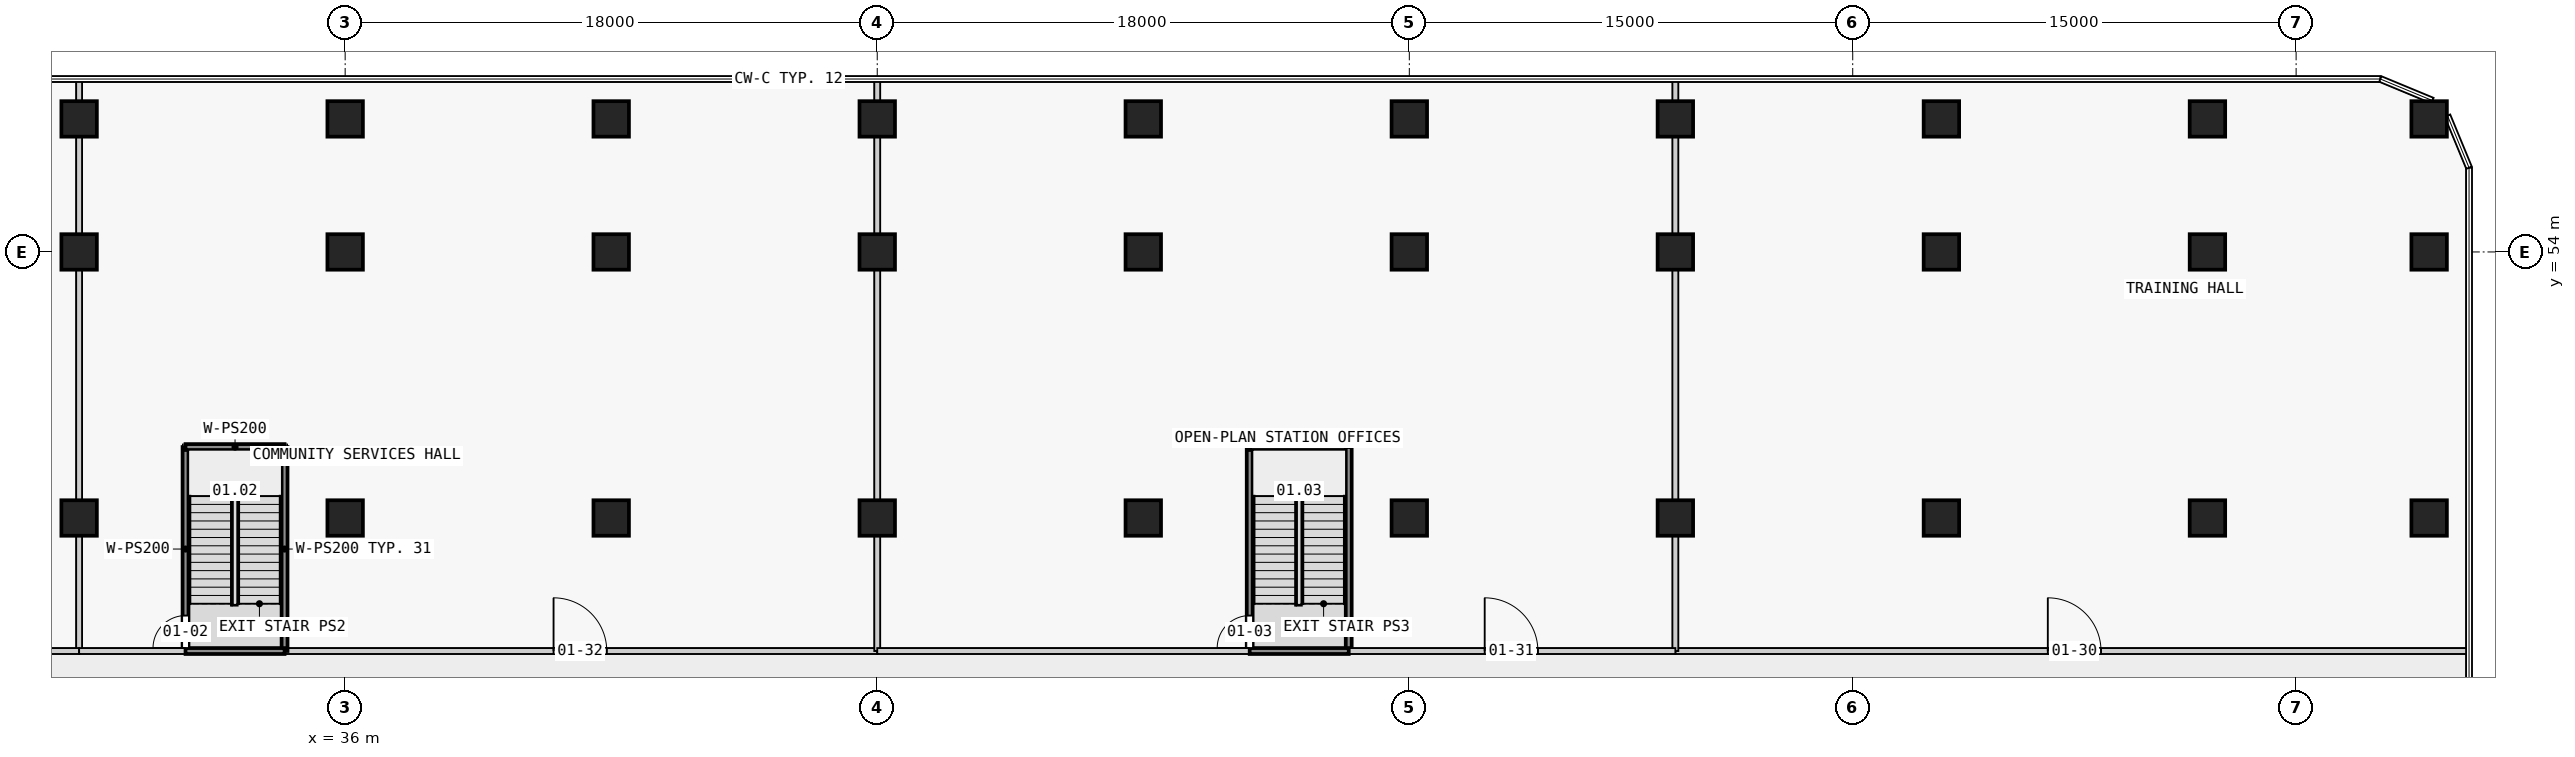
"""IFC4 building model, lengths in metres.
Left out: names, types, materials, properties, quantities, classifications, styles, units other than length and angle.
Written with IfcOpenShell. Run it as: python <this file> out.ifc"""

import sys

from ifc_helpers import new_model, si_unit, direction, frame, frame_2d, origin, origin_2d, place, context, subcontext, project, spatial, rectangle, extrude, element, fill, save


model = new_model("IFC4")
c1 = context("Model", 3, precision=1e-05, world=origin(), true_north=direction((0.0, 1.0)))
c2 = subcontext(c1, "Body", "Model", "MODEL_VIEW")
j1 = project(units=[si_unit("LENGTHUNIT", "METRE"), si_unit("PLANEANGLEUNIT", "RADIAN")], contexts=[c1])
p1 = place(None, origin())
s1 = spatial("IfcSite", under=j1, at=p1, CompositionType="ELEMENT")
p2 = place(p1, origin())
s2 = spatial("IfcBuilding", under=s1, at=p2, CompositionType="ELEMENT")
p3 = place(p2, frame((0.0, 0.0, 8.0)))
s3 = spatial("IfcBuildingStorey", under=s2, at=p3, CompositionType="ELEMENT", Elevation=8.0)
for number, where, z_axis, x_axis in (
    (1, (27.0, 45.0, 0.0), (0.0, 0.0, 1.0), (1.0, 0.0, 0.0)),
    (2, (27.0, 54.0, 0.0), (0.0, 0.0, 1.0), (1.0, 0.0, 0.0)),
    (3, (27.0, 58.5, 0.0), (0.0, 0.0, 1.0), (1.0, 0.0, 0.0)),
    (4, (36.0, 45.0, 0.0), (0.0, 0.0, 1.0), (1.0, 0.0, 0.0)),
    (5, (36.0, 54.0, 0.0), (0.0, 0.0, 1.0), (1.0, 0.0, 0.0)),
    (6, (36.0, 58.5, 0.0), (0.0, 0.0, 1.0), (1.0, 0.0, 0.0)),
    (7, (45.0, 45.0, 0.0), (0.0, 0.0, 1.0), (1.0, 0.0, 0.0)),
    (8, (45.0, 54.0, 0.0), (0.0, 0.0, 1.0), (1.0, 0.0, 0.0)),
    (9, (45.0, 58.5, 0.0), (0.0, 0.0, 1.0), (1.0, 0.0, 0.0)),
    (10, (54.0, 45.0, 0.0), (0.0, 0.0, 1.0), (1.0, 0.0, 0.0)),
    (11, (54.0, 54.0, 0.0), (0.0, 0.0, 1.0), (1.0, 0.0, 0.0)),
    (12, (54.0, 58.5, 0.0), (0.0, 0.0, 1.0), (1.0, 0.0, 0.0)),
    (13, (63.0, 45.0, 0.0), (0.0, 0.0, 1.0), (1.0, 0.0, 0.0)),
    (14, (63.0, 54.0, 0.0), (0.0, 0.0, 1.0), (1.0, 0.0, 0.0)),
    (15, (63.0, 58.5, 0.0), (0.0, 0.0, 1.0), (1.0, 0.0, 0.0)),
    (16, (72.0, 45.0, 0.0), (0.0, 0.0, 1.0), (1.0, 0.0, 0.0)),
    (17, (72.0, 54.0, 0.0), (0.0, 0.0, 1.0), (1.0, 0.0, 0.0)),
    (18, (72.0, 58.5, 0.0), (0.0, 0.0, 1.0), (1.0, 0.0, 0.0)),
    (19, (81.0, 45.0, 0.0), (0.0, 0.0, 1.0), (1.0, 0.0, 0.0)),
    (20, (81.0, 54.0, 0.0), (0.0, 0.0, 1.0), (1.0, 0.0, 0.0)),
    (21, (81.0, 58.5, 0.0), (0.0, 0.0, 1.0), (1.0, 0.0, 0.0)),
    (22, (90.0, 45.0, 0.0), (0.0, 0.0, 1.0), (1.0, 0.0, 0.0)),
    (23, (90.0, 54.0, 0.0), (0.0, 0.0, 1.0), (1.0, 0.0, 0.0)),
    (24, (90.0, 58.5, 0.0), (0.0, 0.0, 1.0), (1.0, 0.0, 0.0)),
    (25, (99.0, 45.0, 0.0), (0.0, 0.0, 1.0), (1.0, 0.0, 0.0)),
    (26, (99.0, 54.0, 0.0), (0.0, 0.0, 1.0), (1.0, 0.0, 0.0)),
    (27, (99.0, 58.5, 0.0), (0.0, 0.0, 1.0), (1.0, 0.0, 0.0)),
    (28, (106.5, 45.0, 0.0), (0.0, 0.0, 1.0), (1.0, 0.0, 0.0)),
    (29, (106.5, 54.0, 0.0), (0.0, 0.0, 1.0), (1.0, 0.0, 0.0)),
    (30, (106.5, 58.5, 0.0), (0.0, 0.0, 1.0), (1.0, 0.0, 0.0)),
):
    element("IfcColumn", number, at=place(p3, frame(where, z_axis=z_axis, x_axis=x_axis)), inside=s3, PredefinedType="COLUMN", context=c2, shape_type="SweptSolid", body=[
        extrude(rectangle(XDim=1.2, YDim=1.2, at=origin_2d()), origin(), (0.0, 0.0, 1.0), 4.8),
    ])
p4 = place(p3, frame((81.0, 40.5, 0.0), z_axis=(0.0, 0.0, 1.0), x_axis=(1.0, 0.0, 0.0)))
e31 = element("IfcWall", 31, at=p4, inside=s3, PredefinedType="PARTITIONING", context=c2, shape_type="SweptSolid", body=[
    extrude(rectangle(XDim=26.85, YDim=0.2, at=frame_2d((13.425, 0.0))), origin(), (0.0, 0.0, 1.0), 3.75),
])
p5 = place(p4, frame((12.6, 0.0, 0.0)))
e32 = element("IfcOpeningElement", 32, at=p5, cuts=e31, PredefinedType="OPENING", context=c2, shape_type="SweptSolid", body=[
    extrude(rectangle(XDim=1.8, YDim=2.1, at=frame_2d((0.9, 1.05))), frame((0.0, 0.11, 0.0), z_axis=(0.0, -1.0, 0.0), x_axis=(1.0, 0.0, 0.0)), (0.0, 0.0, 1.0), 0.22),
])
p6 = place(p3, frame((33.95, 40.5, 0.0), z_axis=(0.0, 0.0, 1.0), x_axis=(1.0, 0.0, 0.0)))
e33 = element("IfcWall", 33, at=p6, inside=s3, PredefinedType="PARTITIONING", context=c2, shape_type="SweptSolid", body=[
    extrude(rectangle(XDim=20.05, YDim=0.2, at=frame_2d((10.025, 0.0))), origin(), (0.0, 0.0, 1.0), 3.75),
])
p7 = place(p6, frame((9.1, 0.0, 0.0)))
e34 = element("IfcOpeningElement", 34, at=p7, cuts=e33, PredefinedType="OPENING", context=c2, shape_type="SweptSolid", body=[
    extrude(rectangle(XDim=1.8, YDim=2.1, at=frame_2d((0.9, 1.05))), frame((0.0, 0.11, 0.0), z_axis=(0.0, -1.0, 0.0), x_axis=(1.0, 0.0, 0.0)), (0.0, 0.0, 1.0), 0.22),
])
p8 = place(p3, frame((54.0, 59.85, 0.0), z_axis=(0.0, 0.0, 1.0), x_axis=(0.0, -1.0, 0.0)))
e35 = element("IfcWall", 35, at=p8, inside=s3, PredefinedType="PARTITIONING", context=c2, shape_type="SweptSolid", body=[
    extrude(rectangle(XDim=0.75, YDim=0.2, at=frame_2d((0.375, 0.0))), origin(), (0.0, 0.0, 1.0), 4.45),
])
p9 = place(p3, frame((54.0, 57.9, 0.0), z_axis=(0.0, 0.0, 1.0), x_axis=(0.0, -1.0, 0.0)))
e36 = element("IfcWall", 36, at=p9, inside=s3, PredefinedType="PARTITIONING", context=c2, shape_type="SweptSolid", body=[
    extrude(rectangle(XDim=3.3, YDim=0.2, at=frame_2d((1.65, 0.0))), origin(), (0.0, 0.0, 1.0), 3.75),
])
p10 = place(p3, frame((54.0, 53.4, 0.0), z_axis=(0.0, 0.0, 1.0), x_axis=(0.0, -1.0, 0.0)))
e37 = element("IfcWall", 37, at=p10, inside=s3, PredefinedType="PARTITIONING", context=c2, shape_type="SweptSolid", body=[
    extrude(rectangle(XDim=7.8, YDim=0.2, at=frame_2d((3.9, 0.0))), origin(), (0.0, 0.0, 1.0), 3.75),
])
p11 = place(p3, frame((54.0, 44.4, 0.0), z_axis=(0.0, 0.0, 1.0), x_axis=(0.0, -1.0, 0.0)))
e38 = element("IfcWall", 38, at=p11, inside=s3, PredefinedType="PARTITIONING", context=c2, shape_type="SweptSolid", body=[
    extrude(rectangle(XDim=3.9, YDim=0.2, at=frame_2d((1.95, 0.0))), origin(), (0.0, 0.0, 1.0), 3.75),
])
p12 = place(p3, frame((81.0, 59.85, 0.0), z_axis=(0.0, 0.0, 1.0), x_axis=(0.0, -1.0, 0.0)))
e39 = element("IfcWall", 39, at=p12, inside=s3, PredefinedType="PARTITIONING", context=c2, shape_type="SweptSolid", body=[
    extrude(rectangle(XDim=0.75, YDim=0.2, at=frame_2d((0.375, 0.0))), origin(), (0.0, 0.0, 1.0), 4.45),
])
p13 = place(p3, frame((81.0, 57.9, 0.0), z_axis=(0.0, 0.0, 1.0), x_axis=(0.0, -1.0, 0.0)))
e40 = element("IfcWall", 40, at=p13, inside=s3, PredefinedType="PARTITIONING", context=c2, shape_type="SweptSolid", body=[
    extrude(rectangle(XDim=3.3, YDim=0.2, at=frame_2d((1.65, 0.0))), origin(), (0.0, 0.0, 1.0), 3.75),
])
p14 = place(p3, frame((81.0, 53.4, 0.0), z_axis=(0.0, 0.0, 1.0), x_axis=(0.0, -1.0, 0.0)))
e41 = element("IfcWall", 41, at=p14, inside=s3, PredefinedType="PARTITIONING", context=c2, shape_type="SweptSolid", body=[
    extrude(rectangle(XDim=7.8, YDim=0.2, at=frame_2d((3.9, 0.0))), origin(), (0.0, 0.0, 1.0), 3.75),
])
p15 = place(p3, frame((81.0, 44.4, 0.0), z_axis=(0.0, 0.0, 1.0), x_axis=(0.0, -1.0, 0.0)))
e42 = element("IfcWall", 42, at=p15, inside=s3, PredefinedType="PARTITIONING", context=c2, shape_type="SweptSolid", body=[
    extrude(rectangle(XDim=3.9, YDim=0.2, at=frame_2d((1.95, 0.0))), origin(), (0.0, 0.0, 1.0), 3.75),
])
p16 = place(p3, frame((27.0, 59.85, 0.0), z_axis=(0.0, 0.0, 1.0), x_axis=(0.0, -1.0, 0.0)))
e43 = element("IfcWall", 43, at=p16, inside=s3, PredefinedType="PARTITIONING", context=c2, shape_type="SweptSolid", body=[
    extrude(rectangle(XDim=0.75, YDim=0.2, at=frame_2d((0.375, 0.0))), origin(), (0.0, 0.0, 1.0), 4.45),
])
p17 = place(p3, frame((27.0, 57.9, 0.0), z_axis=(0.0, 0.0, 1.0), x_axis=(0.0, -1.0, 0.0)))
e44 = element("IfcWall", 44, at=p17, inside=s3, PredefinedType="PARTITIONING", context=c2, shape_type="SweptSolid", body=[
    extrude(rectangle(XDim=3.3, YDim=0.2, at=frame_2d((1.65, 0.0))), origin(), (0.0, 0.0, 1.0), 3.75),
])
p18 = place(p3, frame((27.0, 53.4, 0.0), z_axis=(0.0, 0.0, 1.0), x_axis=(0.0, -1.0, 0.0)))
e45 = element("IfcWall", 45, at=p18, inside=s3, PredefinedType="PARTITIONING", context=c2, shape_type="SweptSolid", body=[
    extrude(rectangle(XDim=7.8, YDim=0.2, at=frame_2d((3.9, 0.0))), origin(), (0.0, 0.0, 1.0), 3.75),
])
p19 = place(p3, frame((27.0, 44.4, 0.0), z_axis=(0.0, 0.0, 1.0), x_axis=(0.0, -1.0, 0.0)))
e46 = element("IfcWall", 46, at=p19, inside=s3, PredefinedType="PARTITIONING", context=c2, shape_type="SweptSolid", body=[
    extrude(rectangle(XDim=3.9, YDim=0.2, at=frame_2d((1.95, 0.0))), origin(), (0.0, 0.0, 1.0), 3.75),
])
p20 = place(p3, frame((30.6, 40.5, 0.0), z_axis=(0.0, 0.0, 1.0), x_axis=(0.0, 1.0, 0.0)))
e47 = element("IfcWall", 47, at=p20, inside=s3, PredefinedType="PARTITIONING", context=c2, shape_type="SweptSolid", body=[
    extrude(rectangle(XDim=6.9, YDim=0.2, at=frame_2d((3.45, 0.0))), origin(), (0.0, 0.0, 1.0), 4.45),
])
p21 = place(p20, frame((0.1, 0.0, 0.0)))
e48 = element("IfcOpeningElement", 48, at=p21, cuts=e47, PredefinedType="OPENING", context=c2, shape_type="SweptSolid", body=[
    extrude(rectangle(XDim=1.1, YDim=2.1, at=frame_2d((0.55, 1.05))), frame((0.0, 0.11, 0.0), z_axis=(0.0, -1.0, 0.0), x_axis=(1.0, 0.0, 0.0)), (0.0, 0.0, 1.0), 0.22),
])
p22 = place(p3, frame((30.6, 47.4, 0.0), z_axis=(0.0, 0.0, 1.0), x_axis=(1.0, 0.0, 0.0)))
e49 = element("IfcWall", 49, at=p22, inside=s3, PredefinedType="PARTITIONING", context=c2, shape_type="SweptSolid", body=[
    extrude(rectangle(XDim=3.35, YDim=0.2, at=frame_2d((1.675, 0.0))), origin(), (0.0, 0.0, 1.0), 4.45),
])
p23 = place(p3, frame((33.95, 47.4, 0.0), z_axis=(0.0, 0.0, 1.0), x_axis=(0.0, -1.0, 0.0)))
e50 = element("IfcWall", 50, at=p23, inside=s3, PredefinedType="PARTITIONING", context=c2, shape_type="SweptSolid", body=[
    extrude(rectangle(XDim=6.9, YDim=0.2, at=frame_2d((3.45, 0.0))), origin(), (0.0, 0.0, 1.0), 4.45),
])
p24 = place(p3, frame((66.6, 40.5, 0.0), z_axis=(0.0, 0.0, 1.0), x_axis=(0.0, 1.0, 0.0)))
e51 = element("IfcWall", 51, at=p24, inside=s3, PredefinedType="PARTITIONING", context=c2, shape_type="SweptSolid", body=[
    extrude(rectangle(XDim=6.9, YDim=0.2, at=frame_2d((3.45, 0.0))), origin(), (0.0, 0.0, 1.0), 4.45),
])
p25 = place(p24, frame((0.1, 0.0, 0.0)))
e52 = element("IfcOpeningElement", 52, at=p25, cuts=e51, PredefinedType="OPENING", context=c2, shape_type="SweptSolid", body=[
    extrude(rectangle(XDim=1.1, YDim=2.1, at=frame_2d((0.55, 1.05))), frame((0.0, 0.11, 0.0), z_axis=(0.0, -1.0, 0.0), x_axis=(1.0, 0.0, 0.0)), (0.0, 0.0, 1.0), 0.22),
])
p26 = place(p3, frame((66.6, 47.4, 0.0), z_axis=(0.0, 0.0, 1.0), x_axis=(1.0, 0.0, 0.0)))
e53 = element("IfcWall", 53, at=p26, inside=s3, PredefinedType="PARTITIONING", context=c2, shape_type="SweptSolid", body=[
    extrude(rectangle(XDim=3.35, YDim=0.2, at=frame_2d((1.675, 0.0))), origin(), (0.0, 0.0, 1.0), 4.45),
])
p27 = place(p3, frame((69.95, 47.4, 0.0), z_axis=(0.0, 0.0, 1.0), x_axis=(0.0, -1.0, 0.0)))
e54 = element("IfcWall", 54, at=p27, inside=s3, PredefinedType="PARTITIONING", context=c2, shape_type="SweptSolid", body=[
    extrude(rectangle(XDim=6.9, YDim=0.2, at=frame_2d((3.45, 0.0))), origin(), (0.0, 0.0, 1.0), 4.45),
])
p28 = place(p3, frame((54.0, 40.5, 0.0), z_axis=(0.0, 0.0, 1.0), x_axis=(1.0, 0.0, 0.0)))
e55 = element("IfcWall", 55, at=p28, inside=s3, PredefinedType="PARTITIONING", context=c2, shape_type="SweptSolid", body=[
    extrude(rectangle(XDim=12.6, YDim=0.2, at=frame_2d((6.3, 0.0))), origin(), (0.0, 0.0, 1.0), 3.75),
])
p29 = place(p3, frame((69.95, 40.5, 0.0), z_axis=(0.0, 0.0, 1.0), x_axis=(1.0, 0.0, 0.0)))
e56 = element("IfcWall", 56, at=p29, inside=s3, PredefinedType="PARTITIONING", context=c2, shape_type="SweptSolid", body=[
    extrude(rectangle(XDim=11.05, YDim=0.2, at=frame_2d((5.525, 0.0))), origin(), (0.0, 0.0, 1.0), 3.75),
])
p30 = place(p29, frame((4.6, 0.0, 0.0)))
e57 = element("IfcOpeningElement", 57, at=p30, cuts=e56, PredefinedType="OPENING", context=c2, shape_type="SweptSolid", body=[
    extrude(rectangle(XDim=1.8, YDim=2.1, at=frame_2d((0.9, 1.05))), frame((0.0, 0.11, 0.0), z_axis=(0.0, -1.0, 0.0), x_axis=(1.0, 0.0, 0.0)), (0.0, 0.0, 1.0), 0.22),
])
p31 = place(p3, frame((16.15, 40.5, 0.0), z_axis=(0.0, 0.0, 1.0), x_axis=(1.0, 0.0, 0.0)))
e58 = element("IfcWall", 58, at=p31, inside=s3, PredefinedType="PARTITIONING", context=c2, shape_type="SweptSolid", body=[
    extrude(rectangle(XDim=10.85, YDim=0.2, at=frame_2d((5.425, 0.0))), origin(), (0.0, 0.0, 1.0), 3.75),
])
p32 = place(p3, frame((27.0, 40.5, 0.0), z_axis=(0.0, 0.0, 1.0), x_axis=(1.0, 0.0, 0.0)))
e59 = element("IfcWall", 59, at=p32, inside=s3, PredefinedType="PARTITIONING", context=c2, shape_type="SweptSolid", body=[
    extrude(rectangle(XDim=3.6, YDim=0.2, at=frame_2d((1.8, 0.0))), origin(), (0.0, 0.0, 1.0), 3.75),
])
for number, where, z_axis, x_axis in (
    (60, (33.95, 40.5, 0.0), (0.0, 0.0, 1.0), (-1.0, 0.0, 0.0)),
    (61, (69.95, 40.5, 0.0), (0.0, 0.0, 1.0), (-1.0, 0.0, 0.0)),
):
    element("IfcWall", number, at=place(p3, frame(where, z_axis=z_axis, x_axis=x_axis)), inside=s3, PredefinedType="PARTITIONING", context=c2, shape_type="SweptSolid", body=[
        extrude(rectangle(XDim=3.35, YDim=0.2, at=frame_2d((1.675, 0.0))), origin(), (0.0, 0.0, 1.0), 4.45),
    ])
p33 = place(p21, origin())
e62 = element("IfcDoor", 62, at=p33, inside=s3, OperationType="SINGLE_SWING_LEFT", PredefinedType="DOOR", context=c2, shape_type="SweptSolid", body=[
    extrude(rectangle(XDim=1.1, YDim=2.1, at=frame_2d((0.55, 1.05))), frame((0.0, 0.025, 0.0), z_axis=(0.0, -1.0, 0.0), x_axis=(1.0, 0.0, 0.0)), (0.0, 0.0, 1.0), 0.05),
])
fill(e48, e62)
p34 = place(p25, origin())
e63 = element("IfcDoor", 63, at=p34, inside=s3, OperationType="SINGLE_SWING_LEFT", PredefinedType="DOOR", context=c2, shape_type="SweptSolid", body=[
    extrude(rectangle(XDim=1.1, YDim=2.1, at=frame_2d((0.55, 1.05))), frame((0.0, 0.025, 0.0), z_axis=(0.0, -1.0, 0.0), x_axis=(1.0, 0.0, 0.0)), (0.0, 0.0, 1.0), 0.05),
])
fill(e52, e63)
p35 = place(p5, origin())
e64 = element("IfcDoor", 64, at=p35, inside=s3, OperationType="DOUBLE_DOOR_SINGLE_SWING", PredefinedType="DOOR", context=c2, shape_type="SweptSolid", body=[
    extrude(rectangle(XDim=1.8, YDim=2.1, at=frame_2d((0.9, 1.05))), frame((0.0, 0.025, 0.0), z_axis=(0.0, -1.0, 0.0), x_axis=(1.0, 0.0, 0.0)), (0.0, 0.0, 1.0), 0.05),
])
fill(e32, e64)
p36 = place(p30, origin())
e65 = element("IfcDoor", 65, at=p36, inside=s3, OperationType="DOUBLE_DOOR_SINGLE_SWING", PredefinedType="DOOR", context=c2, shape_type="SweptSolid", body=[
    extrude(rectangle(XDim=1.8, YDim=2.1, at=frame_2d((0.9, 1.05))), frame((0.0, 0.025, 0.0), z_axis=(0.0, -1.0, 0.0), x_axis=(1.0, 0.0, 0.0)), (0.0, 0.0, 1.0), 0.05),
])
fill(e57, e65)
p37 = place(p7, origin())
e66 = element("IfcDoor", 66, at=p37, inside=s3, OperationType="DOUBLE_DOOR_SINGLE_SWING", PredefinedType="DOOR", context=c2, shape_type="SweptSolid", body=[
    extrude(rectangle(XDim=1.8, YDim=2.1, at=frame_2d((0.9, 1.05))), frame((0.0, 0.025, 0.0), z_axis=(0.0, -1.0, 0.0), x_axis=(1.0, 0.0, 0.0)), (0.0, 0.0, 1.0), 0.05),
])
fill(e34, e66)
save(model, sys.argv[1])
